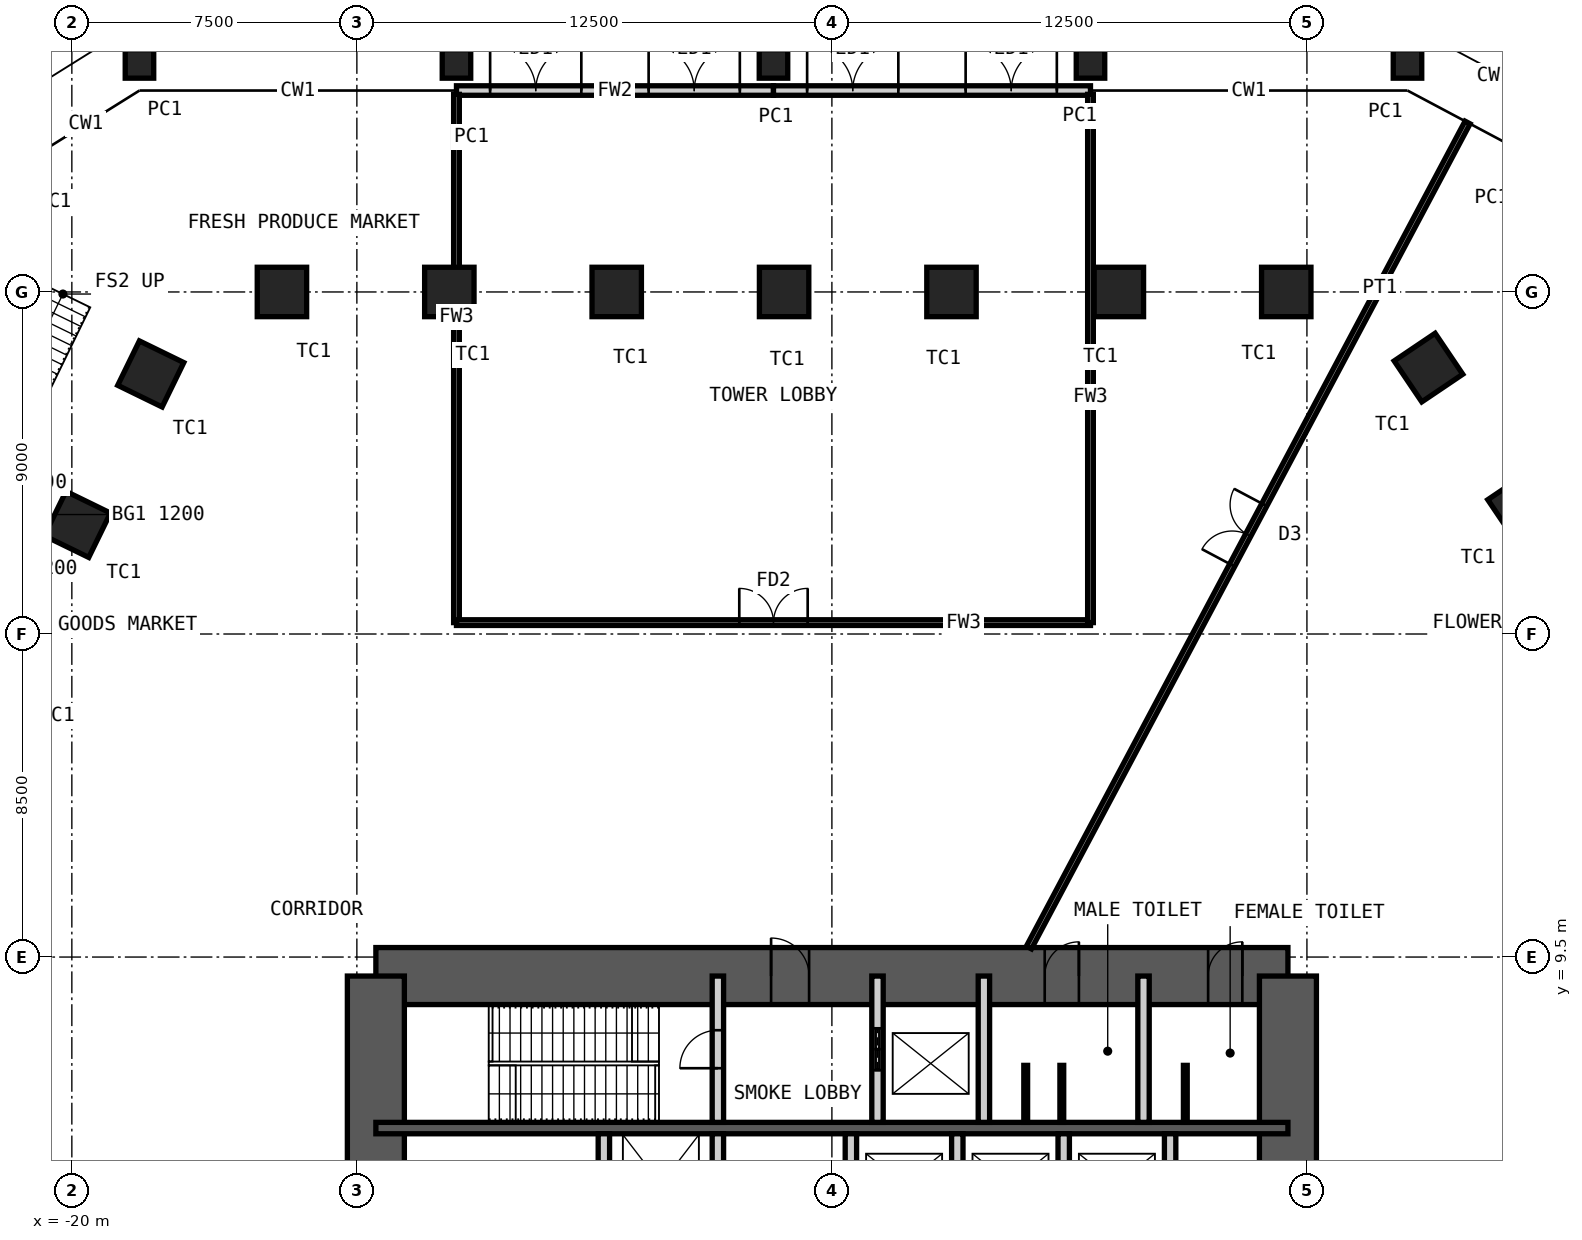
"""IFC4 building model, lengths in metres.
Left out: names, types, materials, properties, quantities, classifications, styles, units other than length and angle.
Written with IfcOpenShell. Run it as: python <this file> out.ifc"""

import sys

from ifc_helpers import new_model, si_unit, direction, frame, frame_2d, origin, origin_2d, place, context, subcontext, project, spatial, rectangle, hollow_rectangle, extrude, element, fill, save


model = new_model("IFC4")
c1 = context("Model", 3, precision=1e-05, world=origin(), true_north=direction((0.0, 1.0)))
c2 = subcontext(c1, "Body", "Model", "MODEL_VIEW")
j1 = project(units=[si_unit("LENGTHUNIT", "METRE"), si_unit("PLANEANGLEUNIT", "RADIAN")], contexts=[c1])
p1 = place(None, origin())
s1 = spatial("IfcSite", under=j1, at=p1, CompositionType="ELEMENT")
p2 = place(p1, origin())
s2 = spatial("IfcBuilding", under=s1, at=p2, CompositionType="ELEMENT")
p3 = place(p2, origin())
s3 = spatial("IfcBuildingStorey", under=s2, at=p3, CompositionType="ELEMENT", Elevation=0.0)
for number, where, z_axis, x_axis in (
    (1, (-14.471, 27.0, 0.0), (0.0, 0.0, 1.0), (-1.0, 0.0, 0.0)),
    (2, (-10.067, 27.0, 0.0), (0.0, 0.0, 1.0), (-1.0, 0.0, 0.0)),
    (3, (-5.662, 27.0, 0.0), (0.0, 0.0, 1.0), (-1.0, 0.0, 0.0)),
    (4, (-1.258, 27.0, 0.0), (0.0, 0.0, 1.0), (-1.0, 0.0, 0.0)),
    (5, (3.147, 27.0, 0.0), (0.0, 0.0, 1.0), (-1.0, 0.0, 0.0)),
    (6, (7.552, 27.0, 0.0), (0.0, 0.0, 1.0), (-1.0, 0.0, 0.0)),
    (7, (11.956, 27.0, 0.0), (0.0, 0.0, 1.0), (-1.0, 0.0, 0.0)),
    (8, (15.698, 25.01, 0.0), (0.0, 0.0, 1.0), (-0.559, 0.829, 0.0)),
    (9, (18.161, 21.359, 0.0), (0.0, 0.0, 1.0), (-0.559, 0.829, 0.0)),
    (10, (-19.854, 20.884, 0.0), (0.0, 0.0, 1.0), (-0.438, -0.899, 0.0)),
    (11, (-17.924, 24.843, 0.0), (0.0, 0.0, 1.0), (-0.438, -0.899, 0.0)),
):
    element("IfcColumn", number, at=place(p3, frame(where, z_axis=z_axis, x_axis=x_axis)), inside=s3, PredefinedType="COLUMN", context=c2, shape_type="SweptSolid", body=[
        extrude(hollow_rectangle(XDim=1.3, YDim=1.3, WallThickness=0.1, at=origin_2d()), origin(), (0.0, 0.0, 1.0), 6.0),
    ])
for number, where, z_axis, x_axis in (
    (12, (-18.221, 33.0, 0.0), (0.0, 0.0, 1.0), (-1.0, 0.0, 0.0)),
    (13, (-9.879, 33.0, 0.0), (0.0, 0.0, 1.0), (-1.0, 0.0, 0.0)),
    (14, (-1.537, 33.0, 0.0), (0.0, 0.0, 1.0), (-1.0, 0.0, 0.0)),
    (15, (6.805, 33.0, 0.0), (0.0, 0.0, 1.0), (-1.0, 0.0, 0.0)),
    (16, (15.146, 33.0, 0.0), (0.0, 0.0, 1.0), (-1.0, 0.0, 0.0)),
):
    element("IfcColumn", number, at=place(p3, frame(where, z_axis=z_axis, x_axis=x_axis)), inside=s3, PredefinedType="COLUMN", context=c2, shape_type="SweptSolid", body=[
        extrude(hollow_rectangle(XDim=0.75, YDim=0.75, WallThickness=0.036, at=origin_2d()), origin(), (0.0, 0.0, 1.0), 6.0),
    ])
p4 = place(p3, frame((-12.0, 9.0, 0.0), z_axis=(0.0, 0.0, 1.0), x_axis=(1.0, 0.0, 0.0)))
e17 = element("IfcWall", 17, at=p4, inside=s3, PredefinedType="SHEAR", context=c2, shape_type="SweptSolid", body=[
    extrude(rectangle(XDim=24.0, YDim=1.5, at=frame_2d((12.0, 0.0))), origin(), (0.0, 0.0, 1.0), 6.0),
])
p5 = place(p4, frame((10.4, 0.0, 0.0)))
e18 = element("IfcOpeningElement", 18, at=p5, cuts=e17, PredefinedType="OPENING", context=c2, shape_type="SweptSolid", body=[
    extrude(rectangle(XDim=1.0, YDim=2.1, at=frame_2d((0.5, 1.05))), frame((0.0, 0.76, 0.0), z_axis=(0.0, -1.0, 0.0), x_axis=(1.0, 0.0, 0.0)), (0.0, 0.0, 1.0), 1.52),
])
p6 = place(p4, frame((17.6, 0.0, 0.0)))
e19 = element("IfcOpeningElement", 19, at=p6, cuts=e17, PredefinedType="OPENING", context=c2, shape_type="SweptSolid", body=[
    extrude(rectangle(XDim=0.9, YDim=2.1, at=frame_2d((0.45, 1.05))), frame((0.0, 0.76, 0.0), z_axis=(0.0, -1.0, 0.0), x_axis=(1.0, 0.0, 0.0)), (0.0, 0.0, 1.0), 1.52),
])
p7 = place(p4, frame((21.9, 0.0, 0.0)))
e20 = element("IfcOpeningElement", 20, at=p7, cuts=e17, PredefinedType="OPENING", context=c2, shape_type="SweptSolid", body=[
    extrude(rectangle(XDim=0.9, YDim=2.1, at=frame_2d((0.45, 1.05))), frame((0.0, 0.76, 0.0), z_axis=(0.0, -1.0, 0.0), x_axis=(1.0, 0.0, 0.0)), (0.0, 0.0, 1.0), 1.52),
])
p8 = place(p3, frame((12.0, -9.0, 0.0), z_axis=(0.0, 0.0, 1.0), x_axis=(0.0, 1.0, 0.0)))
e21 = element("IfcWall", 21, at=p8, inside=s3, PredefinedType="SHEAR", context=c2, shape_type="SweptSolid", body=[
    extrude(rectangle(XDim=18.0, YDim=1.5, at=frame_2d((9.0, 0.0))), origin(), (0.0, 0.0, 1.0), 6.0),
])
p9 = place(p8, frame((8.1, 0.0, 0.0)))
e22 = element("IfcOpeningElement", 22, at=p9, cuts=e21, PredefinedType="OPENING", context=c2, shape_type="SweptSolid", body=[
    extrude(rectangle(XDim=1.8, YDim=2.1, at=frame_2d((0.9, 1.05))), frame((0.0, 0.76, 0.0), z_axis=(0.0, -1.0, 0.0), x_axis=(1.0, 0.0, 0.0)), (0.0, 0.0, 1.0), 1.52),
])
p10 = place(p3, frame((-12.0, -9.0, 0.0), z_axis=(0.0, 0.0, 1.0), x_axis=(0.0, 1.0, 0.0)))
e23 = element("IfcWall", 23, at=p10, inside=s3, PredefinedType="SHEAR", context=c2, shape_type="SweptSolid", body=[
    extrude(rectangle(XDim=18.0, YDim=1.5, at=frame_2d((9.0, 0.0))), origin(), (0.0, 0.0, 1.0), 6.0),
])
p11 = place(p10, frame((8.1, 0.0, 0.0)))
e24 = element("IfcOpeningElement", 24, at=p11, cuts=e23, PredefinedType="OPENING", context=c2, shape_type="SweptSolid", body=[
    extrude(rectangle(XDim=1.8, YDim=2.1, at=frame_2d((0.9, 1.05))), frame((0.0, 0.76, 0.0), z_axis=(0.0, -1.0, 0.0), x_axis=(1.0, 0.0, 0.0)), (0.0, 0.0, 1.0), 1.52),
])
p12 = place(p3, frame((-12.0, 5.0, 0.0), z_axis=(0.0, 0.0, 1.0), x_axis=(1.0, 0.0, 0.0)))
e25 = element("IfcWall", 25, at=p12, inside=s3, PredefinedType="SHEAR", context=c2, shape_type="SweptSolid", body=[
    extrude(rectangle(XDim=24.0, YDim=0.3, at=frame_2d((12.0, 0.0))), origin(), (0.0, 0.0, 1.0), 6.0),
])
p13 = place(p3, frame((-3.0, 5.15, 0.0), z_axis=(0.0, 0.0, 1.0), x_axis=(0.0, 1.0, 0.0)))
e26 = element("IfcWall", 26, at=p13, inside=s3, PredefinedType="PARTITIONING", context=c2, shape_type="SweptSolid", body=[
    extrude(rectangle(XDim=3.85, YDim=0.3, at=frame_2d((1.925, 0.0))), origin(), (0.0, 0.0, 1.0), 5.78),
])
p14 = place(p13, frame((1.425, 0.0, 0.0)))
e27 = element("IfcOpeningElement", 27, at=p14, cuts=e26, PredefinedType="OPENING", context=c2, shape_type="SweptSolid", body=[
    extrude(rectangle(XDim=1.0, YDim=2.1, at=frame_2d((0.5, 1.05))), frame((0.0, 0.16, 0.0), z_axis=(0.0, -1.0, 0.0), x_axis=(1.0, 0.0, 0.0)), (0.0, 0.0, 1.0), 0.32),
])
p15 = place(p3, frame((1.2, 5.15, 0.0), z_axis=(0.0, 0.0, 1.0), x_axis=(0.0, 1.0, 0.0)))
e28 = element("IfcWall", 28, at=p15, inside=s3, PredefinedType="PARTITIONING", context=c2, shape_type="SweptSolid", body=[
    extrude(rectangle(XDim=3.85, YDim=0.3, at=frame_2d((1.925, 0.0))), origin(), (0.0, 0.0, 1.0), 5.78),
])
p16 = place(p15, frame((1.375, 0.0, 0.0)))
e29 = element("IfcOpeningElement", 29, at=p16, cuts=e28, PredefinedType="OPENING", context=c2, shape_type="SweptSolid", body=[
    extrude(rectangle(XDim=1.1, YDim=2.4, at=frame_2d((0.55, 1.2))), frame((0.0, 0.16, 0.0), z_axis=(0.0, -1.0, 0.0), x_axis=(1.0, 0.0, 0.0)), (0.0, 0.0, 1.0), 0.32),
])
for number, where, z_axis, x_axis in (
    (30, (4.0, 5.15, 0.0), (0.0, 0.0, 1.0), (0.0, 1.0, 0.0)),
    (31, (8.2, 5.15, 0.0), (0.0, 0.0, 1.0), (0.0, 1.0, 0.0)),
):
    element("IfcWall", number, at=place(p3, frame(where, z_axis=z_axis, x_axis=x_axis)), inside=s3, PredefinedType="PARTITIONING", context=c2, shape_type="SweptSolid", body=[
        extrude(rectangle(XDim=3.85, YDim=0.3, at=frame_2d((1.925, 0.0))), origin(), (0.0, 0.0, 1.0), 5.78),
    ])
for number, where, z_axis, x_axis in (
    (32, (-6.0, 2.2, 0.0), (0.0, 0.0, 1.0), (0.0, 1.0, 0.0)),
    (33, (-3.0, 2.2, 0.0), (0.0, 0.0, 1.0), (0.0, 1.0, 0.0)),
    (34, (0.5, 2.2, 0.0), (0.0, 0.0, 1.0), (0.0, 1.0, 0.0)),
    (35, (3.3, 2.2, 0.0), (0.0, 0.0, 1.0), (0.0, 1.0, 0.0)),
    (36, (6.1, 2.2, 0.0), (0.0, 0.0, 1.0), (0.0, 1.0, 0.0)),
    (37, (8.9, 2.2, 0.0), (0.0, 0.0, 1.0), (0.0, 1.0, 0.0)),
):
    element("IfcWall", number, at=place(p3, frame(where, z_axis=z_axis, x_axis=x_axis)), inside=s3, PredefinedType="PARTITIONING", context=c2, shape_type="SweptSolid", body=[
        extrude(rectangle(XDim=2.65, YDim=0.3, at=frame_2d((1.325, 0.0))), origin(), (0.0, 0.0, 1.0), 5.78),
    ])
p17 = place(p3, frame((-9.879, 32.3, 0.0), z_axis=(0.0, 0.0, 1.0), x_axis=(1.0, 0.0, 0.0)))
e38 = element("IfcWall", 38, at=p17, inside=s3, PredefinedType="SOLIDWALL", context=c2, shape_type="SweptSolid", body=[
    extrude(rectangle(XDim=8.342, YDim=0.25, at=frame_2d((4.171, 0.0))), origin(), (0.0, 0.0, 1.0), 5.75),
])
p18 = place(p17, frame((0.885, 0.0, 0.0)))
e39 = element("IfcOpeningElement", 39, at=p18, cuts=e38, PredefinedType="OPENING", context=c2, shape_type="SweptSolid", body=[
    extrude(rectangle(XDim=2.4, YDim=3.0, at=frame_2d((1.2, 1.5))), frame((0.0, 0.135, 0.0), z_axis=(0.0, -1.0, 0.0), x_axis=(1.0, 0.0, 0.0)), (0.0, 0.0, 1.0), 0.27),
])
p19 = place(p17, frame((5.056, 0.0, 0.0)))
e40 = element("IfcOpeningElement", 40, at=p19, cuts=e38, PredefinedType="OPENING", context=c2, shape_type="SweptSolid", body=[
    extrude(rectangle(XDim=2.4, YDim=3.0, at=frame_2d((1.2, 1.5))), frame((0.0, 0.135, 0.0), z_axis=(0.0, -1.0, 0.0), x_axis=(1.0, 0.0, 0.0)), (0.0, 0.0, 1.0), 0.27),
])
p20 = place(p3, frame((-1.537, 32.3, 0.0), z_axis=(0.0, 0.0, 1.0), x_axis=(1.0, 0.0, 0.0)))
e41 = element("IfcWall", 41, at=p20, inside=s3, PredefinedType="SOLIDWALL", context=c2, shape_type="SweptSolid", body=[
    extrude(rectangle(XDim=8.342, YDim=0.25, at=frame_2d((4.171, 0.0))), origin(), (0.0, 0.0, 1.0), 5.75),
])
p21 = place(p20, frame((0.885, 0.0, 0.0)))
e42 = element("IfcOpeningElement", 42, at=p21, cuts=e41, PredefinedType="OPENING", context=c2, shape_type="SweptSolid", body=[
    extrude(rectangle(XDim=2.4, YDim=3.0, at=frame_2d((1.2, 1.5))), frame((0.0, 0.135, 0.0), z_axis=(0.0, -1.0, 0.0), x_axis=(1.0, 0.0, 0.0)), (0.0, 0.0, 1.0), 0.27),
])
p22 = place(p20, frame((5.056, 0.0, 0.0)))
e43 = element("IfcOpeningElement", 43, at=p22, cuts=e41, PredefinedType="OPENING", context=c2, shape_type="SweptSolid", body=[
    extrude(rectangle(XDim=2.4, YDim=3.0, at=frame_2d((1.2, 1.5))), frame((0.0, 0.135, 0.0), z_axis=(0.0, -1.0, 0.0), x_axis=(1.0, 0.0, 0.0)), (0.0, 0.0, 1.0), 0.27),
])
for number, where, z_axis, x_axis in (
    (44, (5.1, 5.15, 0.0), (0.0, 0.0, 1.0), (0.0, 1.0, 0.0)),
    (45, (6.05, 5.15, 0.0), (0.0, 0.0, 1.0), (0.0, 1.0, 0.0)),
    (46, (9.3, 5.15, 0.0), (0.0, 0.0, 1.0), (0.0, 1.0, 0.0)),
):
    element("IfcWall", number, at=place(p3, frame(where, z_axis=z_axis, x_axis=x_axis)), inside=s3, PredefinedType="PARTITIONING", context=c2, shape_type="SweptSolid", body=[
        extrude(rectangle(XDim=1.5, YDim=0.1, at=frame_2d((0.75, 0.0))), origin(), (0.0, 0.0, 1.0), 2.1),
    ])
p23 = place(p3, frame((-9.879, 32.2, 0.0), z_axis=(0.0, 0.0, 1.0), x_axis=(0.0, -1.0, 0.0)))
e47 = element("IfcWall", 47, at=p23, inside=s3, PredefinedType="PARTITIONING", context=c2, shape_type="SweptSolid", body=[
    extrude(rectangle(XDim=13.9, YDim=0.15, at=frame_2d((6.95, 0.0))), origin(), (0.0, 0.0, 1.0), 5.75),
])
p24 = place(p3, frame((6.805, 32.2, 0.0), z_axis=(0.0, 0.0, 1.0), x_axis=(0.0, -1.0, 0.0)))
e48 = element("IfcWall", 48, at=p24, inside=s3, PredefinedType="PARTITIONING", context=c2, shape_type="SweptSolid", body=[
    extrude(rectangle(XDim=0.802, YDim=0.15, at=frame_2d((0.401, 0.0))), origin(), (0.0, 0.0, 1.0), 4.65),
])
p25 = place(p3, frame((-9.879, 18.3, 0.0), z_axis=(0.0, 0.0, 1.0), x_axis=(1.0, 0.0, 0.0)))
e49 = element("IfcWall", 49, at=p25, inside=s3, PredefinedType="PARTITIONING", context=c2, shape_type="SweptSolid", body=[
    extrude(rectangle(XDim=16.684, YDim=0.15, at=frame_2d((8.342, 0.0))), origin(), (0.0, 0.0, 1.0), 5.75),
])
p26 = place(p25, frame((7.442, 0.0, 0.0)))
e50 = element("IfcOpeningElement", 50, at=p26, cuts=e49, PredefinedType="OPENING", context=c2, shape_type="SweptSolid", body=[
    extrude(rectangle(XDim=1.8, YDim=2.1, at=frame_2d((0.9, 1.05))), frame((0.0, 0.085, 0.0), z_axis=(0.0, -1.0, 0.0), x_axis=(1.0, 0.0, 0.0)), (0.0, 0.0, 1.0), 0.17),
])
p27 = place(p3, frame((5.184, 9.75, 0.0), z_axis=(0.0, 0.0, 1.0), x_axis=(0.469474147629, 0.882946218469, 0.0)))
e51 = element("IfcWall", 51, at=p27, inside=s3, PredefinedType="PARTITIONING", context=c2, shape_type="SweptSolid", body=[
    extrude(rectangle(XDim=24.588, YDim=0.15, at=frame_2d((12.294, 0.0))), origin(), (0.0, 0.0, 1.0), 5.75),
])
p28 = place(p27, frame((11.394, 0.0, 0.0)))
e52 = element("IfcOpeningElement", 52, at=p28, cuts=e51, PredefinedType="OPENING", context=c2, shape_type="SweptSolid", body=[
    extrude(rectangle(XDim=1.8, YDim=2.4, at=frame_2d((0.9, 1.2))), frame((0.0, 0.085, 0.0), z_axis=(0.0, -1.0, 0.0), x_axis=(1.0, 0.0, 0.0)), (0.0, 0.0, 1.0), 0.17),
])
p29 = place(p3, frame((6.805, 31.398, 0.0), z_axis=(0.0, 0.0, 1.0), x_axis=(0.0, -1.0, 0.0)))
e53 = element("IfcWall", 53, at=p29, inside=s3, PredefinedType="PARTITIONING", context=c2, shape_type="SweptSolid", body=[
    extrude(rectangle(XDim=13.098, YDim=0.15, at=frame_2d((6.549, 0.0))), origin(), (0.0, 0.0, 1.0), 5.75),
])
p30 = place(p18, origin())
e54 = element("IfcDoor", 54, at=p30, inside=s3, OperationType="DOUBLE_DOOR_DOUBLE_SWING", PredefinedType="DOOR", context=c2, shape_type="SweptSolid", body=[
    extrude(rectangle(XDim=2.4, YDim=3.0, at=frame_2d((1.2, 1.5))), frame((0.0, 0.025, 0.0), z_axis=(0.0, -1.0, 0.0), x_axis=(1.0, 0.0, 0.0)), (0.0, 0.0, 1.0), 0.05),
])
fill(e39, e54)
p31 = place(p19, origin())
e55 = element("IfcDoor", 55, at=p31, inside=s3, OperationType="DOUBLE_DOOR_DOUBLE_SWING", PredefinedType="DOOR", context=c2, shape_type="SweptSolid", body=[
    extrude(rectangle(XDim=2.4, YDim=3.0, at=frame_2d((1.2, 1.5))), frame((0.0, 0.025, 0.0), z_axis=(0.0, -1.0, 0.0), x_axis=(1.0, 0.0, 0.0)), (0.0, 0.0, 1.0), 0.05),
])
fill(e40, e55)
p32 = place(p21, origin())
e56 = element("IfcDoor", 56, at=p32, inside=s3, OperationType="DOUBLE_DOOR_DOUBLE_SWING", PredefinedType="DOOR", context=c2, shape_type="SweptSolid", body=[
    extrude(rectangle(XDim=2.4, YDim=3.0, at=frame_2d((1.2, 1.5))), frame((0.0, 0.025, 0.0), z_axis=(0.0, -1.0, 0.0), x_axis=(1.0, 0.0, 0.0)), (0.0, 0.0, 1.0), 0.05),
])
fill(e42, e56)
p33 = place(p22, origin())
e57 = element("IfcDoor", 57, at=p33, inside=s3, OperationType="DOUBLE_DOOR_DOUBLE_SWING", PredefinedType="DOOR", context=c2, shape_type="SweptSolid", body=[
    extrude(rectangle(XDim=2.4, YDim=3.0, at=frame_2d((1.2, 1.5))), frame((0.0, 0.025, 0.0), z_axis=(0.0, -1.0, 0.0), x_axis=(1.0, 0.0, 0.0)), (0.0, 0.0, 1.0), 0.05),
])
fill(e43, e57)
p34 = place(p5, origin())
e58 = element("IfcDoor", 58, at=p34, inside=s3, OperationType="SINGLE_SWING_RIGHT", PredefinedType="DOOR", context=c2, shape_type="SweptSolid", body=[
    extrude(rectangle(XDim=1.0, YDim=2.1, at=frame_2d((0.5, 1.05))), frame((0.0, 0.025, 0.0), z_axis=(0.0, -1.0, 0.0), x_axis=(1.0, 0.0, 0.0)), (0.0, 0.0, 1.0), 0.05),
])
fill(e18, e58)
p35 = place(p6, origin())
e59 = element("IfcDoor", 59, at=p35, inside=s3, OperationType="SINGLE_SWING_LEFT", PredefinedType="DOOR", context=c2, shape_type="SweptSolid", body=[
    extrude(rectangle(XDim=0.9, YDim=2.1, at=frame_2d((0.45, 1.05))), frame((0.0, 0.025, 0.0), z_axis=(0.0, -1.0, 0.0), x_axis=(1.0, 0.0, 0.0)), (0.0, 0.0, 1.0), 0.05),
])
fill(e19, e59)
p36 = place(p7, origin())
e60 = element("IfcDoor", 60, at=p36, inside=s3, OperationType="SINGLE_SWING_LEFT", PredefinedType="DOOR", context=c2, shape_type="SweptSolid", body=[
    extrude(rectangle(XDim=0.9, YDim=2.1, at=frame_2d((0.45, 1.05))), frame((0.0, 0.025, 0.0), z_axis=(0.0, -1.0, 0.0), x_axis=(1.0, 0.0, 0.0)), (0.0, 0.0, 1.0), 0.05),
])
fill(e20, e60)
p37 = place(p14, origin())
e61 = element("IfcDoor", 61, at=p37, inside=s3, OperationType="SINGLE_SWING_RIGHT", PredefinedType="DOOR", context=c2, shape_type="SweptSolid", body=[
    extrude(rectangle(XDim=1.0, YDim=2.1, at=frame_2d((0.5, 1.05))), frame((0.0, 0.025, 0.0), z_axis=(0.0, -1.0, 0.0), x_axis=(1.0, 0.0, 0.0)), (0.0, 0.0, 1.0), 0.05),
])
fill(e27, e61)
p38 = place(p16, origin())
e62 = element("IfcDoor", 62, at=p38, inside=s3, OperationType="DOUBLE_DOOR_SLIDING", PredefinedType="DOOR", context=c2, shape_type="SweptSolid", body=[
    extrude(rectangle(XDim=1.1, YDim=2.4, at=frame_2d((0.55, 1.2))), frame((0.0, 0.025, 0.0), z_axis=(0.0, -1.0, 0.0), x_axis=(1.0, 0.0, 0.0)), (0.0, 0.0, 1.0), 0.05),
])
fill(e29, e62)
p39 = place(p26, origin())
e63 = element("IfcDoor", 63, at=p39, inside=s3, OperationType="DOUBLE_DOOR_DOUBLE_SWING", PredefinedType="DOOR", context=c2, shape_type="SweptSolid", body=[
    extrude(rectangle(XDim=1.8, YDim=2.1, at=frame_2d((0.9, 1.05))), frame((0.0, 0.025, 0.0), z_axis=(0.0, -1.0, 0.0), x_axis=(1.0, 0.0, 0.0)), (0.0, 0.0, 1.0), 0.05),
])
fill(e50, e63)
p40 = place(p28, origin())
e64 = element("IfcDoor", 64, at=p40, inside=s3, OperationType="DOUBLE_DOOR_DOUBLE_SWING", PredefinedType="DOOR", context=c2, shape_type="SweptSolid", body=[
    extrude(rectangle(XDim=1.8, YDim=2.4, at=frame_2d((0.9, 1.2))), frame((0.0, 0.025, 0.0), z_axis=(0.0, -1.0, 0.0), x_axis=(1.0, 0.0, 0.0)), (0.0, 0.0, 1.0), 0.05),
])
fill(e52, e64)
save(model, sys.argv[1])
